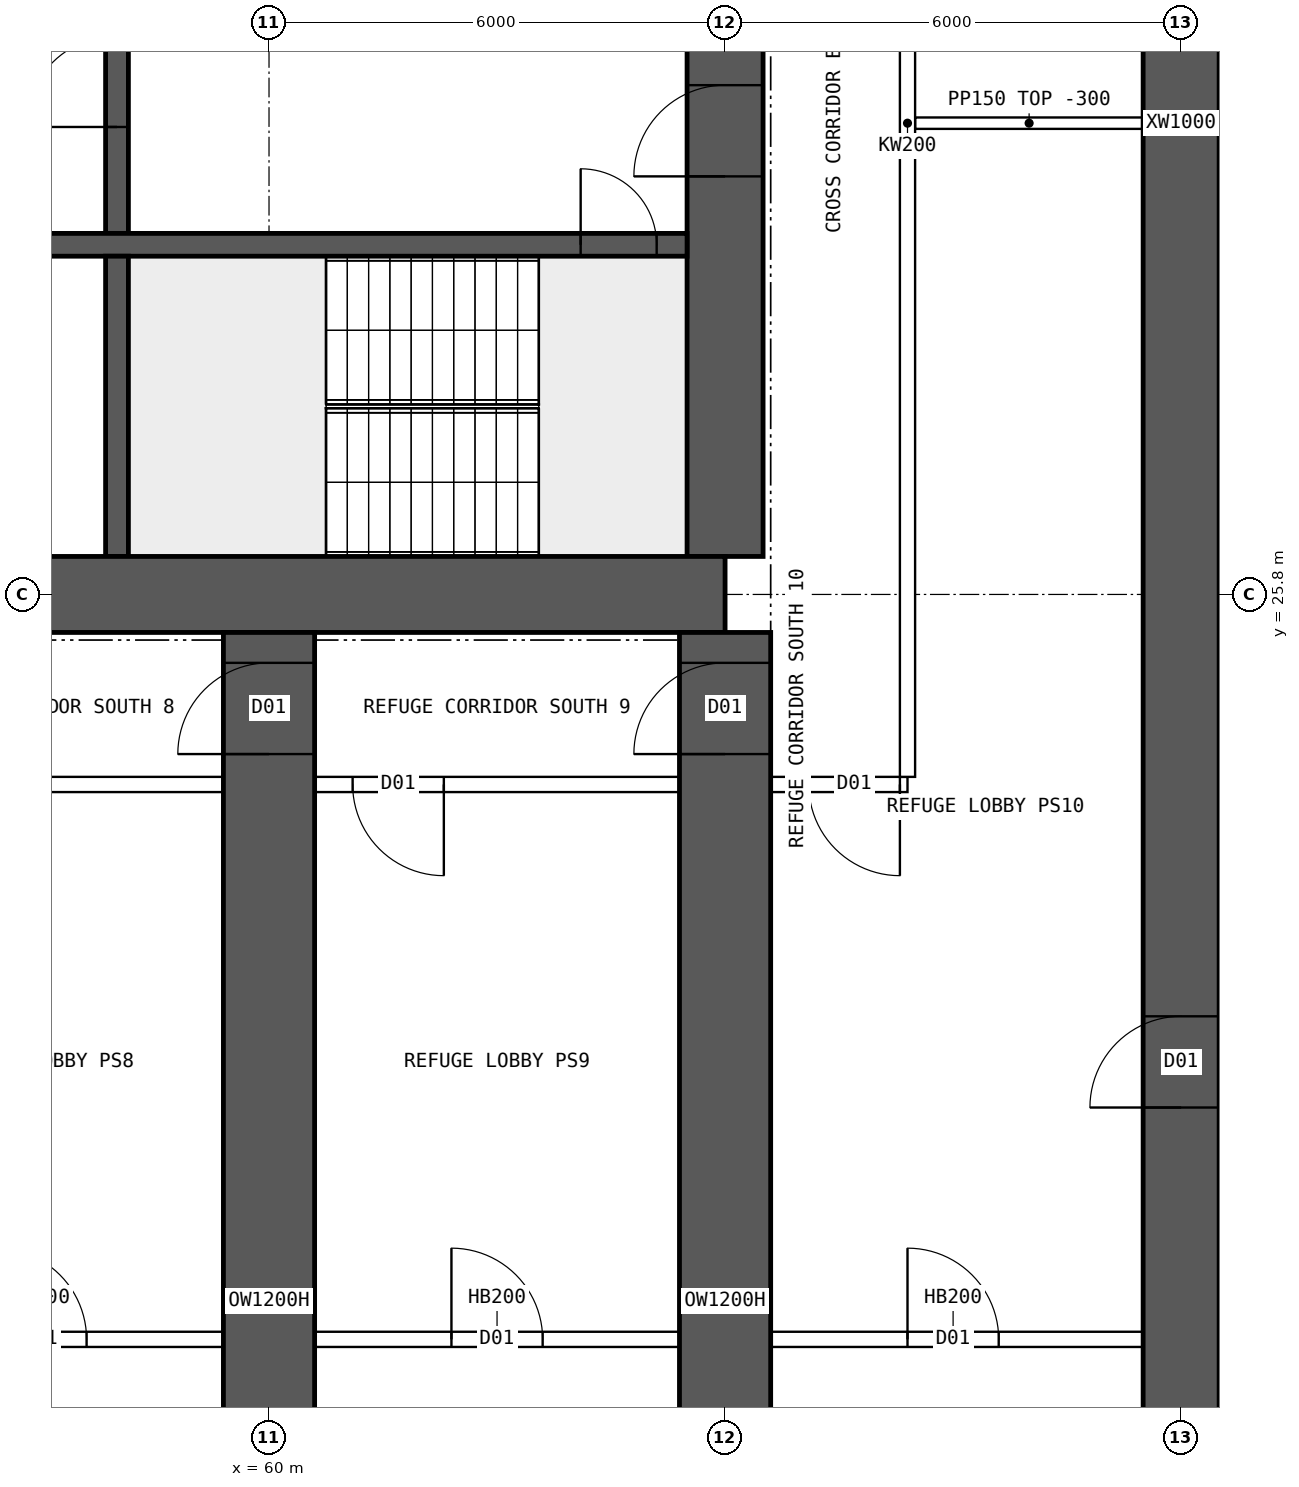
"""IFC4 building model, lengths in metres.
Left out: names, types, materials, properties, quantities, classifications, styles, units other than length and angle.
Written with IfcOpenShell. Run it as: python <this file> out.ifc"""

import sys

from ifc_helpers import new_model, si_unit, direction, frame, frame_2d, origin, place, context, subcontext, project, spatial, rectangle, extrude, element, fill, save


model = new_model("IFC4")
c1 = context("Model", 3, precision=1e-05, world=origin(), true_north=direction((0.0, 1.0)))
c2 = subcontext(c1, "Body", "Model", "MODEL_VIEW")
j1 = project(units=[si_unit("LENGTHUNIT", "METRE"), si_unit("PLANEANGLEUNIT", "RADIAN")], contexts=[c1])
p1 = place(None, origin())
s1 = spatial("IfcSite", under=j1, at=p1, CompositionType="ELEMENT")
p2 = place(p1, origin())
s2 = spatial("IfcBuilding", under=s1, at=p2, CompositionType="ELEMENT")
p3 = place(p2, frame((0.0, 0.0, 68.95)))
s3 = spatial("IfcBuildingStorey", under=s2, at=p3, CompositionType="ELEMENT", Elevation=68.95)
p4 = place(p3, frame((18.0, 25.8, 0.0), z_axis=(0.0, 0.0, 1.0), x_axis=(1.0, 0.0, 0.0)))
e1 = element("IfcWall", 1, at=p4, inside=s3, PredefinedType="SHEAR", context=c2, shape_type="SweptSolid", body=[
    extrude(rectangle(XDim=48.0, YDim=1.0, at=frame_2d((24.0, 0.0))), origin(), (0.0, 0.0, 1.0), 7.2),
])
p5 = place(p3, frame((66.0, 26.3, 0.0), z_axis=(0.0, 0.0, 1.0), x_axis=(0.0, 1.0, 0.0)))
e2 = element("IfcWall", 2, at=p5, inside=s3, PredefinedType="SHEAR", context=c2, shape_type="SweptSolid", body=[
    extrude(rectangle(XDim=11.4, YDim=1.0, at=frame_2d((5.7, 0.0))), origin(), (0.0, 0.0, 1.0), 7.2),
])
p6 = place(p5, frame((5.0, 0.0, 0.0)))
e3 = element("IfcOpeningElement", 3, at=p6, cuts=e2, PredefinedType="OPENING", context=c2, shape_type="SweptSolid", body=[
    extrude(rectangle(XDim=1.2, YDim=2.1, at=frame_2d((0.6, 1.05))), frame((0.0, 0.51, 0.0), z_axis=(0.0, -1.0, 0.0), x_axis=(1.0, 0.0, 0.0)), (0.0, 0.0, 1.0), 1.02),
])
p7 = place(p3, frame((18.5, 30.4, 0.0), z_axis=(0.0, 0.0, 1.0), x_axis=(1.0, 0.0, 0.0)))
e4 = element("IfcWall", 4, at=p7, inside=s3, PredefinedType="SHEAR", context=c2, shape_type="SweptSolid", body=[
    extrude(rectangle(XDim=47.0, YDim=0.3, at=frame_2d((23.5, 0.0))), origin(), (0.0, 0.0, 1.0), 7.2),
])
p8 = place(p7, frame((0.4, 0.0, 0.0)))
e5 = element("IfcOpeningElement", 5, at=p8, cuts=e4, PredefinedType="OPENING", context=c2, shape_type="SweptSolid", body=[
    extrude(rectangle(XDim=1.0, YDim=2.1, at=frame_2d((0.5, 1.05))), frame((0.0, 0.16, 0.0), z_axis=(0.0, -1.0, 0.0), x_axis=(1.0, 0.0, 0.0)), (0.0, 0.0, 1.0), 0.32),
])
p9 = place(p7, frame((45.6, 0.0, 0.0)))
e6 = element("IfcOpeningElement", 6, at=p9, cuts=e4, PredefinedType="OPENING", context=c2, shape_type="SweptSolid", body=[
    extrude(rectangle(XDim=1.0, YDim=2.1, at=frame_2d((0.5, 1.05))), frame((0.0, 0.16, 0.0), z_axis=(0.0, -1.0, 0.0), x_axis=(1.0, 0.0, 0.0)), (0.0, 0.0, 1.0), 0.32),
])
p10 = place(p7, frame((30.117, 0.0, 0.0)))
e7 = element("IfcOpeningElement", 7, at=p10, cuts=e4, PredefinedType="OPENING", context=c2, shape_type="SweptSolid", body=[
    extrude(rectangle(XDim=1.1, YDim=2.1, at=frame_2d((0.55, 1.05))), frame((0.0, 0.16, 0.0), z_axis=(0.0, -1.0, 0.0), x_axis=(1.0, 0.0, 0.0)), (0.0, 0.0, 1.0), 0.32),
])
p11 = place(p7, frame((33.65, 0.0, 0.0)))
e8 = element("IfcOpeningElement", 8, at=p11, cuts=e4, PredefinedType="OPENING", context=c2, shape_type="SweptSolid", body=[
    extrude(rectangle(XDim=1.1, YDim=2.1, at=frame_2d((0.55, 1.05))), frame((0.0, 0.16, 0.0), z_axis=(0.0, -1.0, 0.0), x_axis=(1.0, 0.0, 0.0)), (0.0, 0.0, 1.0), 0.32),
])
p12 = place(p7, frame((37.183, 0.0, 0.0)))
e9 = element("IfcOpeningElement", 9, at=p12, cuts=e4, PredefinedType="OPENING", context=c2, shape_type="SweptSolid", body=[
    extrude(rectangle(XDim=1.1, YDim=2.1, at=frame_2d((0.55, 1.05))), frame((0.0, 0.16, 0.0), z_axis=(0.0, -1.0, 0.0), x_axis=(1.0, 0.0, 0.0)), (0.0, 0.0, 1.0), 0.32),
])
p13 = place(p3, frame((58.0, 26.3, 0.0), z_axis=(0.0, 0.0, 1.0), x_axis=(0.0, 1.0, 0.0)))
e10 = element("IfcWall", 10, at=p13, inside=s3, PredefinedType="SHEAR", context=c2, shape_type="SweptSolid", body=[
    extrude(rectangle(XDim=3.95, YDim=0.3, at=frame_2d((1.975, 0.0))), origin(), (0.0, 0.0, 1.0), 7.2),
])
p14 = place(p3, frame((58.0, 30.55, 0.0), z_axis=(0.0, 0.0, 1.0), x_axis=(0.0, 1.0, 0.0)))
e11 = element("IfcWall", 11, at=p14, inside=s3, PredefinedType="SHEAR", context=c2, shape_type="SweptSolid", body=[
    extrude(rectangle(XDim=3.9, YDim=0.3, at=frame_2d((1.95, 0.0))), origin(), (0.0, 0.0, 1.0), 7.2),
])
p15 = place(p14, frame((1.4, 0.0, 0.0)))
e12 = element("IfcOpeningElement", 12, at=p15, cuts=e11, PredefinedType="OPENING", context=c2, shape_type="SweptSolid", body=[
    extrude(rectangle(XDim=1.2, YDim=2.1, at=frame_2d((0.6, 1.05))), frame((0.0, 0.16, 0.0), z_axis=(0.0, -1.0, 0.0), x_axis=(1.0, 0.0, 0.0)), (0.0, 0.0, 1.0), 0.32),
])
p16 = place(p3, frame((60.0, 7.7, 0.0), z_axis=(0.0, 0.0, 1.0), x_axis=(0.0, 1.0, 0.0)))
e13 = element("IfcWall", 13, at=p16, inside=s3, PredefinedType="SHEAR", context=c2, shape_type="SweptSolid", body=[
    extrude(rectangle(XDim=17.6, YDim=1.2, at=frame_2d((8.8, 0.0))), origin(), (0.0, 0.0, 1.0), 7.2),
])
p17 = place(p16, frame((16.0, 0.0, 0.0)))
e14 = element("IfcOpeningElement", 14, at=p17, cuts=e13, PredefinedType="OPENING", context=c2, shape_type="SweptSolid", body=[
    extrude(rectangle(XDim=1.2, YDim=2.1, at=frame_2d((0.6, 1.05))), frame((0.0, 0.61, 0.0), z_axis=(0.0, -1.0, 0.0), x_axis=(1.0, 0.0, 0.0)), (0.0, 0.0, 1.0), 1.22),
])
p18 = place(p3, frame((66.0, 7.7, 0.0), z_axis=(0.0, 0.0, 1.0), x_axis=(0.0, 1.0, 0.0)))
e15 = element("IfcWall", 15, at=p18, inside=s3, PredefinedType="SHEAR", context=c2, shape_type="SweptSolid", body=[
    extrude(rectangle(XDim=17.6, YDim=1.2, at=frame_2d((8.8, 0.0))), origin(), (0.0, 0.0, 1.0), 7.2),
])
p19 = place(p18, frame((16.0, 0.0, 0.0)))
e16 = element("IfcOpeningElement", 16, at=p19, cuts=e15, PredefinedType="OPENING", context=c2, shape_type="SweptSolid", body=[
    extrude(rectangle(XDim=1.2, YDim=2.1, at=frame_2d((0.6, 1.05))), frame((0.0, 0.61, 0.0), z_axis=(0.0, -1.0, 0.0), x_axis=(1.0, 0.0, 0.0)), (0.0, 0.0, 1.0), 1.22),
])
p20 = place(p3, frame((72.0, 7.7, 0.0), z_axis=(0.0, 0.0, 1.0), x_axis=(0.0, 1.0, 0.0)))
e17 = element("IfcWall", 17, at=p20, inside=s3, PredefinedType="SHEAR", context=c2, shape_type="SweptSolid", body=[
    extrude(rectangle(XDim=48.6, YDim=1.0, at=frame_2d((24.3, 0.0))), origin(), (0.0, 0.0, 1.0), 7.2),
])
p21 = place(p20, frame((3.85, 0.0, 0.0)))
e18 = element("IfcOpeningElement", 18, at=p21, cuts=e17, PredefinedType="OPENING", context=c2, shape_type="SweptSolid", body=[
    extrude(rectangle(XDim=1.2, YDim=2.1, at=frame_2d((0.6, 1.05))), frame((0.0, 0.51, 0.0), z_axis=(0.0, -1.0, 0.0), x_axis=(1.0, 0.0, 0.0)), (0.0, 0.0, 1.0), 1.02),
])
p22 = place(p20, frame((11.35, 0.0, 0.0)))
e19 = element("IfcOpeningElement", 19, at=p22, cuts=e17, PredefinedType="OPENING", context=c2, shape_type="SweptSolid", body=[
    extrude(rectangle(XDim=1.2, YDim=2.1, at=frame_2d((0.6, 1.05))), frame((0.0, 0.51, 0.0), z_axis=(0.0, -1.0, 0.0), x_axis=(1.0, 0.0, 0.0)), (0.0, 0.0, 1.0), 1.02),
])
p23 = place(p20, frame((43.55, 0.0, 0.0)))
e20 = element("IfcOpeningElement", 20, at=p23, cuts=e17, PredefinedType="OPENING", context=c2, shape_type="SweptSolid", body=[
    extrude(rectangle(XDim=1.2, YDim=2.1, at=frame_2d((0.6, 1.05))), frame((0.0, 0.51, 0.0), z_axis=(0.0, -1.0, 0.0), x_axis=(1.0, 0.0, 0.0)), (0.0, 0.0, 1.0), 1.02),
])
p24 = place(p20, frame((36.05, 0.0, 0.0)))
e21 = element("IfcOpeningElement", 21, at=p24, cuts=e17, PredefinedType="OPENING", context=c2, shape_type="SweptSolid", body=[
    extrude(rectangle(XDim=1.2, YDim=2.1, at=frame_2d((0.6, 1.05))), frame((0.0, 0.51, 0.0), z_axis=(0.0, -1.0, 0.0), x_axis=(1.0, 0.0, 0.0)), (0.0, 0.0, 1.0), 1.02),
])
p25 = place(p3, frame((68.4, 23.3, 0.0), z_axis=(0.0, 0.0, 1.0), x_axis=(-1.0, 0.0, 0.0)))
e22 = element("IfcWall", 22, at=p25, inside=s3, PredefinedType="SOLIDWALL", context=c2, shape_type="SweptSolid", body=[
    extrude(rectangle(XDim=52.8, YDim=0.2, at=frame_2d((26.4, 0.0))), origin(), (0.0, 0.0, 1.0), 6.9),
])
p26 = place(p25, frame((51.0, 0.0, 0.0)))
e23 = element("IfcOpeningElement", 23, at=p26, cuts=e22, PredefinedType="OPENING", context=c2, shape_type="SweptSolid", body=[
    extrude(rectangle(XDim=1.2, YDim=2.1, at=frame_2d((0.6, 1.05))), frame((0.0, 0.11, 0.0), z_axis=(0.0, -1.0, 0.0), x_axis=(1.0, 0.0, 0.0)), (0.0, 0.0, 1.0), 0.22),
])
p27 = place(p25, frame((48.1, 0.0, 0.0)))
e24 = element("IfcOpeningElement", 24, at=p27, cuts=e22, PredefinedType="OPENING", context=c2, shape_type="SweptSolid", body=[
    extrude(rectangle(XDim=1.2, YDim=2.1, at=frame_2d((0.6, 1.05))), frame((0.0, 0.11, 0.0), z_axis=(0.0, -1.0, 0.0), x_axis=(1.0, 0.0, 0.0)), (0.0, 0.0, 1.0), 0.22),
])
p28 = place(p25, frame((42.1, 0.0, 0.0)))
e25 = element("IfcOpeningElement", 25, at=p28, cuts=e22, PredefinedType="OPENING", context=c2, shape_type="SweptSolid", body=[
    extrude(rectangle(XDim=1.2, YDim=2.1, at=frame_2d((0.6, 1.05))), frame((0.0, 0.11, 0.0), z_axis=(0.0, -1.0, 0.0), x_axis=(1.0, 0.0, 0.0)), (0.0, 0.0, 1.0), 0.22),
])
p29 = place(p25, frame((36.1, 0.0, 0.0)))
e26 = element("IfcOpeningElement", 26, at=p29, cuts=e22, PredefinedType="OPENING", context=c2, shape_type="SweptSolid", body=[
    extrude(rectangle(XDim=1.2, YDim=2.1, at=frame_2d((0.6, 1.05))), frame((0.0, 0.11, 0.0), z_axis=(0.0, -1.0, 0.0), x_axis=(1.0, 0.0, 0.0)), (0.0, 0.0, 1.0), 0.22),
])
p30 = place(p25, frame((30.1, 0.0, 0.0)))
e27 = element("IfcOpeningElement", 27, at=p30, cuts=e22, PredefinedType="OPENING", context=c2, shape_type="SweptSolid", body=[
    extrude(rectangle(XDim=1.2, YDim=2.1, at=frame_2d((0.6, 1.05))), frame((0.0, 0.11, 0.0), z_axis=(0.0, -1.0, 0.0), x_axis=(1.0, 0.0, 0.0)), (0.0, 0.0, 1.0), 0.22),
])
p31 = place(p25, frame((24.1, 0.0, 0.0)))
e28 = element("IfcOpeningElement", 28, at=p31, cuts=e22, PredefinedType="OPENING", context=c2, shape_type="SweptSolid", body=[
    extrude(rectangle(XDim=1.2, YDim=2.1, at=frame_2d((0.6, 1.05))), frame((0.0, 0.11, 0.0), z_axis=(0.0, -1.0, 0.0), x_axis=(1.0, 0.0, 0.0)), (0.0, 0.0, 1.0), 0.22),
])
p32 = place(p25, frame((18.1, 0.0, 0.0)))
e29 = element("IfcOpeningElement", 29, at=p32, cuts=e22, PredefinedType="OPENING", context=c2, shape_type="SweptSolid", body=[
    extrude(rectangle(XDim=1.2, YDim=2.1, at=frame_2d((0.6, 1.05))), frame((0.0, 0.11, 0.0), z_axis=(0.0, -1.0, 0.0), x_axis=(1.0, 0.0, 0.0)), (0.0, 0.0, 1.0), 0.22),
])
p33 = place(p25, frame((12.1, 0.0, 0.0)))
e30 = element("IfcOpeningElement", 30, at=p33, cuts=e22, PredefinedType="OPENING", context=c2, shape_type="SweptSolid", body=[
    extrude(rectangle(XDim=1.2, YDim=2.1, at=frame_2d((0.6, 1.05))), frame((0.0, 0.11, 0.0), z_axis=(0.0, -1.0, 0.0), x_axis=(1.0, 0.0, 0.0)), (0.0, 0.0, 1.0), 0.22),
])
p34 = place(p25, frame((6.1, 0.0, 0.0)))
e31 = element("IfcOpeningElement", 31, at=p34, cuts=e22, PredefinedType="OPENING", context=c2, shape_type="SweptSolid", body=[
    extrude(rectangle(XDim=1.2, YDim=2.1, at=frame_2d((0.6, 1.05))), frame((0.0, 0.11, 0.0), z_axis=(0.0, -1.0, 0.0), x_axis=(1.0, 0.0, 0.0)), (0.0, 0.0, 1.0), 0.22),
])
p35 = place(p25, frame((0.1, 0.0, 0.0)))
e32 = element("IfcOpeningElement", 32, at=p35, cuts=e22, PredefinedType="OPENING", context=c2, shape_type="SweptSolid", body=[
    extrude(rectangle(XDim=1.2, YDim=2.1, at=frame_2d((0.6, 1.05))), frame((0.0, 0.11, 0.0), z_axis=(0.0, -1.0, 0.0), x_axis=(1.0, 0.0, 0.0)), (0.0, 0.0, 1.0), 0.22),
])
p36 = place(p3, frame((68.4, 23.4, 0.0), z_axis=(0.0, 0.0, 1.0), x_axis=(0.0, 1.0, 0.0)))
e33 = element("IfcWall", 33, at=p36, inside=s3, PredefinedType="SOLIDWALL", context=c2, shape_type="SweptSolid", body=[
    extrude(rectangle(XDim=17.2, YDim=0.2, at=frame_2d((8.6, 0.0))), origin(), (0.0, 0.0, 1.0), 6.9),
])
p37 = place(p3, frame((54.5, 16.0, 0.0), z_axis=(0.0, 0.0, 1.0), x_axis=(1.0, 0.0, 0.0)))
e34 = element("IfcWall", 34, at=p37, inside=s3, PredefinedType="SOLIDWALL", context=c2, shape_type="SweptSolid", body=[
    extrude(rectangle(XDim=5.0, YDim=0.2, at=frame_2d((2.5, 0.0))), origin(), (0.0, 0.0, 1.0), 6.9),
])
p38 = place(p37, frame((1.9, 0.0, 0.0)))
e35 = element("IfcOpeningElement", 35, at=p38, cuts=e34, PredefinedType="OPENING", context=c2, shape_type="SweptSolid", body=[
    extrude(rectangle(XDim=1.2, YDim=2.1, at=frame_2d((0.6, 1.05))), frame((0.0, 0.11, 0.0), z_axis=(0.0, -1.0, 0.0), x_axis=(1.0, 0.0, 0.0)), (0.0, 0.0, 1.0), 0.22),
])
p39 = place(p3, frame((60.5, 16.0, 0.0), z_axis=(0.0, 0.0, 1.0), x_axis=(1.0, 0.0, 0.0)))
e36 = element("IfcWall", 36, at=p39, inside=s3, PredefinedType="SOLIDWALL", context=c2, shape_type="SweptSolid", body=[
    extrude(rectangle(XDim=5.0, YDim=0.2, at=frame_2d((2.5, 0.0))), origin(), (0.0, 0.0, 1.0), 6.9),
])
p40 = place(p39, frame((1.9, 0.0, 0.0)))
e37 = element("IfcOpeningElement", 37, at=p40, cuts=e36, PredefinedType="OPENING", context=c2, shape_type="SweptSolid", body=[
    extrude(rectangle(XDim=1.2, YDim=2.1, at=frame_2d((0.6, 1.05))), frame((0.0, 0.11, 0.0), z_axis=(0.0, -1.0, 0.0), x_axis=(1.0, 0.0, 0.0)), (0.0, 0.0, 1.0), 0.22),
])
p41 = place(p3, frame((66.5, 16.0, 0.0), z_axis=(0.0, 0.0, 1.0), x_axis=(1.0, 0.0, 0.0)))
e38 = element("IfcWall", 38, at=p41, inside=s3, PredefinedType="SOLIDWALL", context=c2, shape_type="SweptSolid", body=[
    extrude(rectangle(XDim=5.0, YDim=0.2, at=frame_2d((2.5, 0.0))), origin(), (0.0, 0.0, 1.0), 6.9),
])
p42 = place(p41, frame((1.9, 0.0, 0.0)))
e39 = element("IfcOpeningElement", 39, at=p42, cuts=e38, PredefinedType="OPENING", context=c2, shape_type="SweptSolid", body=[
    extrude(rectangle(XDim=1.2, YDim=2.1, at=frame_2d((0.6, 1.05))), frame((0.0, 0.11, 0.0), z_axis=(0.0, -1.0, 0.0), x_axis=(1.0, 0.0, 0.0)), (0.0, 0.0, 1.0), 0.22),
])
p43 = place(p3, frame((68.5, 32.0, 0.0), z_axis=(0.0, 0.0, 1.0), x_axis=(1.0, 0.0, 0.0)))
e40 = element("IfcWall", 40, at=p43, inside=s3, PredefinedType="PARTITIONING", context=c2, shape_type="SweptSolid", body=[
    extrude(rectangle(XDim=3.0, YDim=0.15, at=frame_2d((1.5, 0.0))), origin(), (0.0, 0.0, 1.0), 6.9),
])
p44 = place(p3, frame((72.5, 32.0, 0.0), z_axis=(0.0, 0.0, 1.0), x_axis=(1.0, 0.0, 0.0)))
e41 = element("IfcWall", 41, at=p44, inside=s3, PredefinedType="PARTITIONING", context=c2, shape_type="SweptSolid", body=[
    extrude(rectangle(XDim=7.595, YDim=0.15, at=frame_2d((3.797, 0.0))), origin(), (0.0, 0.0, 1.0), 6.9),
])
p45 = place(p6, origin())
e42 = element("IfcDoor", 42, at=p45, inside=s3, OperationType="SINGLE_SWING_LEFT", PredefinedType="DOOR", context=c2, shape_type="SweptSolid", body=[
    extrude(rectangle(XDim=1.2, YDim=2.1, at=frame_2d((0.6, 1.05))), frame((0.0, 0.025, 0.0), z_axis=(0.0, -1.0, 0.0), x_axis=(1.0, 0.0, 0.0)), (0.0, 0.0, 1.0), 0.05),
])
fill(e3, e42)
p46 = place(p9, origin())
e43 = element("IfcDoor", 43, at=p46, inside=s3, OperationType="SINGLE_SWING_LEFT", PredefinedType="DOOR", context=c2, shape_type="SweptSolid", body=[
    extrude(rectangle(XDim=1.0, YDim=2.1, at=frame_2d((0.5, 1.05))), frame((0.0, 0.025, 0.0), z_axis=(0.0, -1.0, 0.0), x_axis=(1.0, 0.0, 0.0)), (0.0, 0.0, 1.0), 0.05),
])
fill(e6, e43)
p47 = place(p15, origin())
e44 = element("IfcDoor", 44, at=p47, inside=s3, OperationType="SINGLE_SWING_LEFT", PredefinedType="DOOR", context=c2, shape_type="SweptSolid", body=[
    extrude(rectangle(XDim=1.2, YDim=2.1, at=frame_2d((0.6, 1.05))), frame((0.0, 0.025, 0.0), z_axis=(0.0, -1.0, 0.0), x_axis=(1.0, 0.0, 0.0)), (0.0, 0.0, 1.0), 0.05),
])
fill(e12, e44)
p48 = place(p38, origin())
e45 = element("IfcDoor", 45, at=p48, inside=s3, OperationType="SINGLE_SWING_LEFT", PredefinedType="DOOR", context=c2, shape_type="SweptSolid", body=[
    extrude(rectangle(XDim=1.2, YDim=2.1, at=frame_2d((0.6, 1.05))), frame((0.0, 0.025, 0.0), z_axis=(0.0, -1.0, 0.0), x_axis=(1.0, 0.0, 0.0)), (0.0, 0.0, 1.0), 0.05),
])
fill(e35, e45)
p49 = place(p40, origin())
e46 = element("IfcDoor", 46, at=p49, inside=s3, OperationType="SINGLE_SWING_LEFT", PredefinedType="DOOR", context=c2, shape_type="SweptSolid", body=[
    extrude(rectangle(XDim=1.2, YDim=2.1, at=frame_2d((0.6, 1.05))), frame((0.0, 0.025, 0.0), z_axis=(0.0, -1.0, 0.0), x_axis=(1.0, 0.0, 0.0)), (0.0, 0.0, 1.0), 0.05),
])
fill(e37, e46)
p50 = place(p42, origin())
e47 = element("IfcDoor", 47, at=p50, inside=s3, OperationType="SINGLE_SWING_LEFT", PredefinedType="DOOR", context=c2, shape_type="SweptSolid", body=[
    extrude(rectangle(XDim=1.2, YDim=2.1, at=frame_2d((0.6, 1.05))), frame((0.0, 0.025, 0.0), z_axis=(0.0, -1.0, 0.0), x_axis=(1.0, 0.0, 0.0)), (0.0, 0.0, 1.0), 0.05),
])
fill(e39, e47)
p51 = place(p34, origin())
e48 = element("IfcDoor", 48, at=p51, inside=s3, OperationType="SINGLE_SWING_LEFT", PredefinedType="DOOR", context=c2, shape_type="SweptSolid", body=[
    extrude(rectangle(XDim=1.2, YDim=2.1, at=frame_2d((0.6, 1.05))), frame((0.0, 0.025, 0.0), z_axis=(0.0, -1.0, 0.0), x_axis=(1.0, 0.0, 0.0)), (0.0, 0.0, 1.0), 0.05),
])
fill(e31, e48)
p52 = place(p35, origin())
e49 = element("IfcDoor", 49, at=p52, inside=s3, OperationType="SINGLE_SWING_LEFT", PredefinedType="DOOR", context=c2, shape_type="SweptSolid", body=[
    extrude(rectangle(XDim=1.2, YDim=2.1, at=frame_2d((0.6, 1.05))), frame((0.0, 0.025, 0.0), z_axis=(0.0, -1.0, 0.0), x_axis=(1.0, 0.0, 0.0)), (0.0, 0.0, 1.0), 0.05),
])
fill(e32, e49)
p53 = place(p17, origin())
e50 = element("IfcDoor", 50, at=p53, inside=s3, OperationType="SINGLE_SWING_LEFT", PredefinedType="DOOR", context=c2, shape_type="SweptSolid", body=[
    extrude(rectangle(XDim=1.2, YDim=2.1, at=frame_2d((0.6, 1.05))), frame((0.0, 0.025, 0.0), z_axis=(0.0, -1.0, 0.0), x_axis=(1.0, 0.0, 0.0)), (0.0, 0.0, 1.0), 0.05),
])
fill(e14, e50)
p54 = place(p19, origin())
e51 = element("IfcDoor", 51, at=p54, inside=s3, OperationType="SINGLE_SWING_LEFT", PredefinedType="DOOR", context=c2, shape_type="SweptSolid", body=[
    extrude(rectangle(XDim=1.2, YDim=2.1, at=frame_2d((0.6, 1.05))), frame((0.0, 0.025, 0.0), z_axis=(0.0, -1.0, 0.0), x_axis=(1.0, 0.0, 0.0)), (0.0, 0.0, 1.0), 0.05),
])
fill(e16, e51)
p55 = place(p22, origin())
e52 = element("IfcDoor", 52, at=p55, inside=s3, OperationType="SINGLE_SWING_LEFT", PredefinedType="DOOR", context=c2, shape_type="SweptSolid", body=[
    extrude(rectangle(XDim=1.2, YDim=2.1, at=frame_2d((0.6, 1.05))), frame((0.0, -0.435, 0.0), z_axis=(0.0, -1.0, 0.0), x_axis=(1.0, 0.0, 0.0)), (0.0, 0.0, 1.0), 0.05),
])
fill(e19, e52)
save(model, sys.argv[1])
